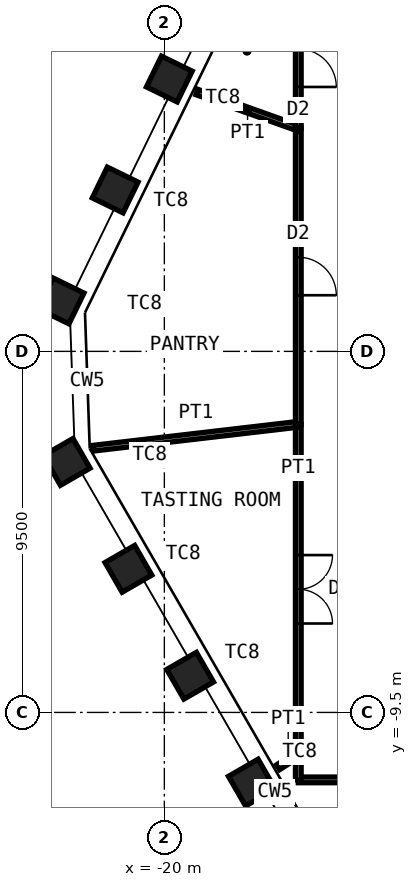
"""IFC4 building model, lengths in metres.
Left out: names, types, materials, properties, quantities, classifications, styles, units other than length and angle.
Written with IfcOpenShell. Run it as: python <this file> out.ifc"""

import sys

from ifc_helpers import new_model, si_unit, direction, frame, frame_2d, origin, origin_2d, place, context, subcontext, project, spatial, rectangle, hollow_rectangle, extrude, element, fill, save


model = new_model("IFC4")
c1 = context("Model", 3, precision=1e-05, world=origin(), true_north=direction((0.0, 1.0)))
c2 = subcontext(c1, "Body", "Model", "MODEL_VIEW")
j1 = project(units=[si_unit("LENGTHUNIT", "METRE"), si_unit("PLANEANGLEUNIT", "RADIAN")], contexts=[c1])
p1 = place(None, origin())
s1 = spatial("IfcSite", under=j1, at=p1, CompositionType="ELEMENT")
p2 = place(p1, origin())
s2 = spatial("IfcBuilding", under=s1, at=p2, CompositionType="ELEMENT")
p3 = place(p2, frame((0.0, 0.0, 312.4)))
s3 = spatial("IfcBuildingStorey", under=s2, at=p3, CompositionType="ELEMENT", Elevation=312.4)
for number, where, z_axis, x_axis in (
    (1, (-17.698, -11.347, 0.0), (0.0, 0.0, 1.0), (0.5, -0.866, 0.0)),
    (2, (-19.322, -8.534, 0.0), (0.0, 0.0, 1.0), (0.5, -0.866, 0.0)),
    (3, (-20.946, -5.721, 0.0), (0.0, 0.0, 1.0), (0.5, -0.866, 0.0)),
    (4, (-22.57, -2.908, 0.0), (0.0, 0.0, 1.0), (0.5, -0.866, 0.0)),
    (5, (-22.717, 1.327, 0.0), (0.0, 0.0, 1.0), (-0.438, -0.899, 0.0)),
    (6, (-21.293, 4.246, 0.0), (0.0, 0.0, 1.0), (-0.438, -0.899, 0.0)),
    (7, (-19.87, 7.166, 0.0), (0.0, 0.0, 1.0), (-0.438, -0.899, 0.0)),
):
    element("IfcColumn", number, at=place(p3, frame(where, z_axis=z_axis, x_axis=x_axis)), inside=s3, PredefinedType="COLUMN", context=c2, shape_type="SweptSolid", body=[
        extrude(hollow_rectangle(XDim=0.9, YDim=0.9, WallThickness=0.05, at=origin_2d()), origin(), (0.0, 0.0, 1.0), 4.2),
    ])
p4 = place(p3, frame((-4.983, -11.275, 0.0), z_axis=(0.0, 0.0, 1.0), x_axis=(-1.0, 0.0, 0.0)))
e8 = element("IfcWall", 8, at=p4, inside=s3, PredefinedType="PARTITIONING", context=c2, shape_type="SweptSolid", body=[
    extrude(rectangle(XDim=11.492, YDim=0.15, at=frame_2d((5.746, 0.0))), origin(), (0.0, 0.0, 1.0), 4.03),
])
p5 = place(p4, frame((4.846, 0.0, 0.0)))
e9 = element("IfcOpeningElement", 9, at=p5, cuts=e8, PredefinedType="OPENING", context=c2, shape_type="SweptSolid", body=[
    extrude(rectangle(XDim=1.8, YDim=2.4, at=frame_2d((0.9, 1.2))), frame((0.0, 0.085, 0.0), z_axis=(0.0, -1.0, 0.0), x_axis=(1.0, 0.0, 0.0)), (0.0, 0.0, 1.0), 0.17),
])
p6 = place(p3, frame((-16.475, -11.275, 0.0), z_axis=(0.0, 0.0, 1.0), x_axis=(0.0, 1.0, 0.0)))
e10 = element("IfcWall", 10, at=p6, inside=s3, PredefinedType="PARTITIONING", context=c2, shape_type="SweptSolid", body=[
    extrude(rectangle(XDim=0.674, YDim=0.15, at=frame_2d((0.337, 0.0))), origin(), (0.0, 0.0, 1.0), 4.03),
])
p7 = place(p3, frame((-17.007, -10.943, 0.0), z_axis=(0.0, 0.0, 1.0), x_axis=(0.840789611822, 0.541362012568, 0.0)))
e11 = element("IfcWall", 11, at=p7, inside=s3, PredefinedType="PARTITIONING", context=c2, shape_type="SweptSolid", body=[
    extrude(rectangle(XDim=0.633, YDim=0.15, at=frame_2d((0.316, 0.0))), origin(), (0.0, 0.0, 1.0), 3.33),
])
p8 = place(p3, frame((-16.475, -10.601, 0.0), z_axis=(0.0, 0.0, 1.0), x_axis=(0.0, 1.0, 0.0)))
e12 = element("IfcWall", 12, at=p8, inside=s3, PredefinedType="PARTITIONING", context=c2, shape_type="SweptSolid", body=[
    extrude(rectangle(XDim=8.681, YDim=0.15, at=frame_2d((4.341, 0.0))), origin(), (0.0, 0.0, 1.0), 4.03),
])
p9 = place(p8, frame((3.441, 0.0, 0.0)))
e13 = element("IfcOpeningElement", 13, at=p9, cuts=e12, PredefinedType="OPENING", context=c2, shape_type="SweptSolid", body=[
    extrude(rectangle(XDim=1.8, YDim=2.4, at=frame_2d((0.9, 1.2))), frame((0.0, 0.085, 0.0), z_axis=(0.0, -1.0, 0.0), x_axis=(1.0, 0.0, 0.0)), (0.0, 0.0, 1.0), 0.17),
])
p10 = place(p3, frame((-21.864, -2.547, 0.0), z_axis=(0.0, 0.0, 1.0), x_axis=(0.993284789299, 0.115694975458, 0.0)))
e14 = element("IfcWall", 14, at=p10, inside=s3, PredefinedType="PARTITIONING", context=c2, shape_type="SweptSolid", body=[
    extrude(rectangle(XDim=5.425, YDim=0.15, at=frame_2d((2.713, 0.0))), origin(), (0.0, 0.0, 1.0), 2.93),
])
p11 = place(p3, frame((-16.475, -1.919, 0.0), z_axis=(0.0, 0.0, 1.0), x_axis=(0.0, 1.0, 0.0)))
e15 = element("IfcWall", 15, at=p11, inside=s3, PredefinedType="PARTITIONING", context=c2, shape_type="SweptSolid", body=[
    extrude(rectangle(XDim=7.792, YDim=0.15, at=frame_2d((3.896, 0.0))), origin(), (0.0, 0.0, 1.0), 4.03),
])
p12 = place(p11, frame((3.396, 0.0, 0.0)))
e16 = element("IfcOpeningElement", 16, at=p12, cuts=e15, PredefinedType="OPENING", context=c2, shape_type="SweptSolid", body=[
    extrude(rectangle(XDim=1.0, YDim=2.4, at=frame_2d((0.5, 1.2))), frame((0.0, 0.085, 0.0), z_axis=(0.0, -1.0, 0.0), x_axis=(1.0, 0.0, 0.0)), (0.0, 0.0, 1.0), 0.17),
])
p13 = place(p3, frame((-19.146, 6.825, 0.0), z_axis=(0.0, 0.0, 1.0), x_axis=(0.94194625765, -0.335763678351, 0.0)))
e17 = element("IfcWall", 17, at=p13, inside=s3, PredefinedType="PARTITIONING", context=c2, shape_type="SweptSolid", body=[
    extrude(rectangle(XDim=2.836, YDim=0.15, at=frame_2d((1.418, 0.0))), origin(), (0.0, 0.0, 1.0), 3.33),
])
p14 = place(p3, frame((-16.475, 5.873, 0.0), z_axis=(0.0, 0.0, 1.0), x_axis=(0.0, 1.0, 0.0)))
e18 = element("IfcWall", 18, at=p14, inside=s3, PredefinedType="PARTITIONING", context=c2, shape_type="SweptSolid", body=[
    extrude(rectangle(XDim=3.169, YDim=0.15, at=frame_2d((1.584, 0.0))), origin(), (0.0, 0.0, 1.0), 4.03),
])
p15 = place(p14, frame((1.084, 0.0, 0.0)))
e19 = element("IfcOpeningElement", 19, at=p15, cuts=e18, PredefinedType="OPENING", context=c2, shape_type="SweptSolid", body=[
    extrude(rectangle(XDim=1.0, YDim=2.4, at=frame_2d((0.5, 1.2))), frame((0.0, 0.085, 0.0), z_axis=(0.0, -1.0, 0.0), x_axis=(1.0, 0.0, 0.0)), (0.0, 0.0, 1.0), 0.17),
])
p16 = place(p9, origin())
e20 = element("IfcDoor", 20, at=p16, inside=s3, OperationType="DOUBLE_DOOR_DOUBLE_SWING", PredefinedType="DOOR", context=c2, shape_type="SweptSolid", body=[
    extrude(rectangle(XDim=1.8, YDim=2.4, at=frame_2d((0.9, 1.2))), frame((0.0, 0.025, 0.0), z_axis=(0.0, -1.0, 0.0), x_axis=(1.0, 0.0, 0.0)), (0.0, 0.0, 1.0), 0.05),
])
fill(e13, e20)
p17 = place(p12, origin())
e21 = element("IfcDoor", 21, at=p17, inside=s3, OperationType="SINGLE_SWING_LEFT", PredefinedType="DOOR", context=c2, shape_type="SweptSolid", body=[
    extrude(rectangle(XDim=1.0, YDim=2.4, at=frame_2d((0.5, 1.2))), frame((0.0, 0.025, 0.0), z_axis=(0.0, -1.0, 0.0), x_axis=(1.0, 0.0, 0.0)), (0.0, 0.0, 1.0), 0.05),
])
fill(e16, e21)
p18 = place(p15, origin())
e22 = element("IfcDoor", 22, at=p18, inside=s3, OperationType="SINGLE_SWING_LEFT", PredefinedType="DOOR", context=c2, shape_type="SweptSolid", body=[
    extrude(rectangle(XDim=1.0, YDim=2.4, at=frame_2d((0.5, 1.2))), frame((0.0, 0.025, 0.0), z_axis=(0.0, -1.0, 0.0), x_axis=(1.0, 0.0, 0.0)), (0.0, 0.0, 1.0), 0.05),
])
fill(e19, e22)
save(model, sys.argv[1])
